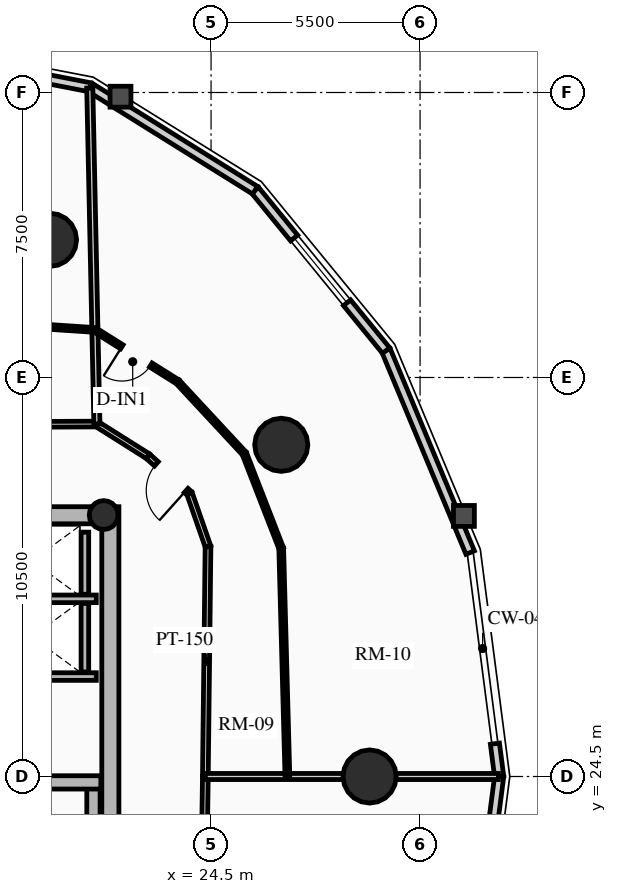
"""IFC4 building model, lengths in metres.
Left out: names, types, materials, properties, quantities, classifications, styles, units other than length and angle.
Written with IfcOpenShell. Run it as: python <this file> out.ifc"""

import sys

from ifc_helpers import new_model, si_unit, direction, frame, frame_2d, origin, origin_2d, place, context, subcontext, project, spatial, rectangle, circle, hollow_circle, extrude, source, transform, mapped, element, fill, save


model = new_model("IFC4")
c1 = context("Model", 3, precision=1e-05, world=origin(), true_north=direction((0.0, 1.0)))
c2 = subcontext(c1, "Body", "Model", "MODEL_VIEW")
j1 = project(units=[si_unit("LENGTHUNIT", "METRE"), si_unit("PLANEANGLEUNIT", "RADIAN")], contexts=[c1])
p1 = place(None, origin())
s1 = spatial("IfcSite", under=j1, at=p1, CompositionType="ELEMENT")
p2 = place(p1, origin())
s2 = spatial("IfcBuilding", under=s1, at=p2, CompositionType="ELEMENT")
p3 = place(p2, frame((0.0, 0.0, 90.52)))
s3 = spatial("IfcBuildingStorey", under=s2, at=p3, CompositionType="ELEMENT", Elevation=90.52)
p4 = place(p3, frame((21.85, 17.4, 0.0), z_axis=(0.0, 0.0, 1.0), x_axis=(0.0, 1.0, 0.0)))
e1 = element("IfcWall", 1, at=p4, inside=s3, PredefinedType="SHEAR", context=c2, shape_type="SweptSolid", body=[
    extrude(rectangle(XDim=14.2, YDim=0.45, at=frame_2d((7.1, 0.0))), origin(), (0.0, 0.0, 1.0), 2.91),
])
p5 = place(p3, frame((11.15, 31.375, 0.0), z_axis=(0.0, 0.0, 1.0), x_axis=(1.0, 0.0, 0.0)))
e2 = element("IfcWall", 2, at=p5, inside=s3, PredefinedType="SHEAR", context=c2, shape_type="SweptSolid", body=[
    extrude(rectangle(XDim=10.7, YDim=0.45, at=frame_2d((5.35, 0.0))), origin(), (0.0, 0.0, 1.0), 2.91),
])
m1 = source(origin(), c2, "Body", "SweptSolid", [
    extrude(rectangle(XDim=1.5, YDim=2.02, at=frame_2d((0.75, 1.01))), frame((0.0, 0.235, 0.0), z_axis=(0.0, -1.0, 0.0), x_axis=(1.0, 0.0, 0.0)), (0.0, 0.0, 1.0), 0.47),
])
p6 = place(p5, frame((4.6, 0.0, 0.0)))
e3 = element("IfcOpeningElement", 3, at=p6, cuts=e2, PredefinedType="OPENING", context=c2, shape_type="MappedRepresentation", body=[
    mapped(m1, transform((0.0, 0.0, 0.0), x_axis=(1.0, 0.0, 0.0), y_axis=(0.0, 1.0, 0.0), z_axis=(0.0, 0.0, 1.0), scale=1.0)),
])
p7 = place(p3, frame((21.405, 17.625, 0.0), z_axis=(0.0, 0.0, 1.0), x_axis=(0.0, 1.0, 0.0)))
e4 = element("IfcWall", 4, at=p7, inside=s3, PredefinedType="SHEAR", context=c2, shape_type="SweptSolid", body=[
    extrude(rectangle(XDim=6.72, YDim=0.35, at=frame_2d((3.36, 0.0))), origin(), (0.0, 0.0, 1.0), 2.91),
])
p8 = place(p3, frame((18.315, 24.345, 0.0), z_axis=(0.0, 0.0, 1.0), x_axis=(1.0, 0.0, 0.0)))
e5 = element("IfcWall", 5, at=p8, inside=s3, PredefinedType="SHEAR", context=c2, shape_type="SweptSolid", body=[
    extrude(rectangle(XDim=3.285, YDim=0.35, at=frame_2d((1.643, 0.0))), origin(), (0.0, 0.0, 1.0), 2.91),
])
p9 = place(p3, frame((21.675, 31.38, 0.0), z_axis=(0.0, 0.0, 1.0), x_axis=(1.0, 0.0, 0.0)))
e6 = element("IfcColumn", 6, at=p9, inside=s3, PredefinedType="COLUMN", context=c2, shape_type="SweptSolid", body=[
    extrude(hollow_circle(Radius=0.38, WallThickness=0.032, at=origin_2d()), origin(), (0.0, 0.0, 1.0), 2.91),
])
for number, where, z_axis, x_axis in (
    (7, (28.672, 24.5, 0.0), (0.0, 0.0, 1.0), (1.0, 0.0, 0.0)),
    (8, (26.347, 33.229, 0.0), (0.0, 0.0, 1.0), (1.0, 0.0, 0.0)),
    (9, (20.261, 38.623, 0.0), (0.0, 0.0, 1.0), (1.0, 0.0, 0.0)),
):
    element("IfcColumn", number, at=place(p3, frame(where, z_axis=z_axis, x_axis=x_axis)), inside=s3, PredefinedType="USERDEFINED", context=c2, shape_type="SweptSolid", body=[
        extrude(circle(Radius=0.7, at=origin_2d()), origin(), (0.0, 0.0, 1.0), 2.91),
    ])
p10 = place(p3, frame((31.969, 25.363, 0.0), z_axis=(0.0, 0.0, 1.0), x_axis=(0.128523364007, -0.991706481225, 0.0)))
e10 = element("IfcWall", 10, at=p10, inside=s3, PredefinedType="SOLIDWALL", context=c2, shape_type="SweptSolid", body=[
    extrude(rectangle(XDim=0.87, YDim=0.24, at=frame_2d((0.435, 0.0))), origin(), (0.0, 0.0, 1.0), 2.655),
])
p11 = place(p3, frame((29.105, 35.709, 0.0), z_axis=(0.0, 0.0, 1.0), x_axis=(0.384344417632, -0.923189779317, 0.0)))
e11 = element("IfcWall", 11, at=p11, inside=s3, PredefinedType="SOLIDWALL", context=c2, shape_type="SweptSolid", body=[
    extrude(rectangle(XDim=5.758, YDim=0.24, at=frame_2d((2.879, 0.0))), origin(), (0.0, 0.0, 1.0), 2.179),
])
p12 = place(p3, frame((25.658, 39.928, 0.0), z_axis=(0.0, 0.0, 1.0), x_axis=(0.632700781152, -0.77439635945, 0.0)))
e12 = element("IfcWall", 12, at=p12, inside=s3, PredefinedType="SOLIDWALL", context=c2, shape_type="SweptSolid", body=[
    extrude(rectangle(XDim=5.448, YDim=0.24, at=frame_2d((2.724, 0.0))), origin(), (0.0, 0.0, 1.0), 2.179),
])
m2 = source(origin(), c2, "Body", "SweptSolid", [
    extrude(rectangle(XDim=2.2, YDim=1.35, at=frame_2d((1.1, 0.675))), frame((0.0, 0.13, 0.0), z_axis=(0.0, -1.0, 0.0), x_axis=(1.0, 0.0, 0.0)), (0.0, 0.0, 1.0), 0.26),
])
p13 = place(p12, frame((1.624, 0.0, 0.65)))
e13 = element("IfcOpeningElement", 13, at=p13, cuts=e12, PredefinedType="OPENING", context=c2, shape_type="MappedRepresentation", body=[
    mapped(m2, transform((0.0, 0.0, 0.0), x_axis=(1.0, 0.0, 0.0), y_axis=(0.0, 1.0, 0.0), z_axis=(0.0, 0.0, 1.0), scale=1.0)),
])
p14 = place(p3, frame((21.315, 42.637, 0.0), z_axis=(0.0, 0.0, 1.0), x_axis=(0.848520380187, -0.529162701263, 0.0)))
e14 = element("IfcWall", 14, at=p14, inside=s3, PredefinedType="SOLIDWALL", context=c2, shape_type="SweptSolid", body=[
    extrude(rectangle(XDim=5.119, YDim=0.24, at=frame_2d((2.56, 0.0))), origin(), (0.0, 0.0, 1.0), 2.179),
])
p15 = place(p3, frame((16.5, 43.57, 0.0), z_axis=(0.0, 0.0, 1.0), x_axis=(0.981723785992, -0.190311344954, 0.0)))
e15 = element("IfcWall", 15, at=p15, inside=s3, PredefinedType="SOLIDWALL", context=c2, shape_type="SweptSolid", body=[
    extrude(rectangle(XDim=4.904, YDim=0.24, at=frame_2d((2.452, 0.0))), origin(), (0.0, 0.0, 1.0), 2.179),
])
m3 = source(origin(), c2, "Body", "SweptSolid", [
    extrude(rectangle(XDim=1.9, YDim=1.35, at=frame_2d((0.95, 0.675))), frame((0.0, 0.13, 0.0), z_axis=(0.0, -1.0, 0.0), x_axis=(1.0, 0.0, 0.0)), (0.0, 0.0, 1.0), 0.26),
])
p16 = place(p15, frame((1.502, 0.0, 0.65)))
e16 = element("IfcOpeningElement", 16, at=p16, cuts=e15, PredefinedType="OPENING", context=c2, shape_type="MappedRepresentation", body=[
    mapped(m3, transform((0.0, 0.0, 0.0), x_axis=(1.0, 0.0, 0.0), y_axis=(0.0, 1.0, 0.0), z_axis=(0.0, 0.0, 1.0), scale=1.0)),
])
p17 = place(p3, frame((32.081, 24.5, 0.0), z_axis=(0.0, 0.0, 1.0), x_axis=(-0.128351991996, -0.991728675672, 0.0)))
e17 = element("IfcWall", 17, at=p17, inside=s3, PredefinedType="SOLIDWALL", context=c2, shape_type="SweptSolid", body=[
    extrude(rectangle(XDim=5.942, YDim=0.24, at=frame_2d((2.971, 0.0))), origin(), (0.0, 0.0, 1.0), 2.179),
])
p18 = place(p17, frame((2.021, 0.0, 0.65)))
e18 = element("IfcOpeningElement", 18, at=p18, cuts=e17, PredefinedType="OPENING", context=c2, shape_type="MappedRepresentation", body=[
    mapped(m3, transform((0.0, 0.0, 0.0), x_axis=(1.0, 0.0, 0.0), y_axis=(0.0, 1.0, 0.0), z_axis=(0.0, 0.0, 1.0), scale=1.0)),
])
for number, where, z_axis, x_axis in (
    (19, (18.51, 27.13, 0.0), (0.0, 0.0, 1.0), (1.0, 0.0, 0.0)),
    (20, (18.51, 29.175, 0.0), (0.0, 0.0, 1.0), (1.0, 0.0, 0.0)),
):
    element("IfcWall", number, at=place(p3, frame(where, z_axis=z_axis, x_axis=x_axis)), inside=s3, PredefinedType="SHEAR", context=c2, shape_type="SweptSolid", body=[
        extrude(rectangle(XDim=2.97, YDim=0.2, at=frame_2d((1.485, 0.0))), origin(), (0.0, 0.0, 1.0), 2.91),
    ])
p19 = place(p3, frame((21.18, 27.25, 0.0), z_axis=(0.0, 0.0, 1.0), x_axis=(0.0, 1.0, 0.0)))
e21 = element("IfcWall", 21, at=p19, inside=s3, PredefinedType="SHEAR", context=c2, shape_type="SweptSolid", body=[
    extrude(rectangle(XDim=1.805, YDim=0.2, at=frame_2d((0.902, 0.0))), origin(), (0.0, 0.0, 1.0), 2.91),
])
p20 = place(p3, frame((21.18, 29.295, 0.0), z_axis=(0.0, 0.0, 1.0), x_axis=(0.0, 1.0, 0.0)))
e22 = element("IfcWall", 22, at=p20, inside=s3, PredefinedType="SHEAR", context=c2, shape_type="SweptSolid", body=[
    extrude(rectangle(XDim=1.635, YDim=0.2, at=frame_2d((0.817, 0.0))), origin(), (0.0, 0.0, 1.0), 2.91),
])
p21 = place(p3, frame((24.35, 24.5, 0.0), z_axis=(0.0, 0.0, 1.0), x_axis=(0.011582078845, 0.999932925475, 0.0)))
e23 = element("IfcWall", 23, at=p21, inside=s3, PredefinedType="PARTITIONING", context=c2, shape_type="SweptSolid", body=[
    extrude(rectangle(XDim=6.05, YDim=0.15, at=frame_2d((3.025, 0.0))), origin(), (0.0, 0.0, 1.0), 2.225),
])
p22 = place(p3, frame((24.42, 30.549, 0.0), z_axis=(0.0, 0.0, 1.0), x_axis=(-0.329071042252, 0.944305167386, 0.0)))
e24 = element("IfcWall", 24, at=p22, inside=s3, PredefinedType="PARTITIONING", context=c2, shape_type="SweptSolid", body=[
    extrude(rectangle(XDim=1.479, YDim=0.15, at=frame_2d((0.74, 0.0))), origin(), (0.0, 0.0, 1.0), 2.225),
])
p23 = place(p3, frame((23.933, 31.946, 0.0), z_axis=(0.0, 0.0, 1.0), x_axis=(-0.744529651383, 0.667589393423, 0.0)))
e25 = element("IfcWall", 25, at=p23, inside=s3, PredefinedType="PARTITIONING", context=c2, shape_type="SweptSolid", body=[
    extrude(rectangle(XDim=1.472, YDim=0.15, at=frame_2d((0.736, 0.0))), origin(), (0.0, 0.0, 1.0), 2.225),
])
m4 = source(origin(), c2, "Body", "SweptSolid", [
    extrude(rectangle(XDim=1.05, YDim=2.015, at=frame_2d((0.525, 1.007))), frame((0.0, 0.085, 0.0), z_axis=(0.0, -1.0, 0.0), x_axis=(1.0, 0.0, 0.0)), (0.0, 0.0, 1.0), 0.17),
])
p24 = place(p23, frame((0.12, 0.0, 0.0)))
e26 = element("IfcOpeningElement", 26, at=p24, cuts=e25, PredefinedType="OPENING", context=c2, shape_type="MappedRepresentation", body=[
    mapped(m4, transform((0.0, 0.0, 0.0), x_axis=(1.0, 0.0, 0.0), y_axis=(0.0, 1.0, 0.0), z_axis=(0.0, 0.0, 1.0), scale=1.0)),
])
p25 = place(p3, frame((22.837, 32.929, 0.0), z_axis=(0.0, 0.0, 1.0), x_axis=(-0.84581079329, 0.533482991252, 0.0)))
e27 = element("IfcWall", 27, at=p25, inside=s3, PredefinedType="PARTITIONING", context=c2, shape_type="SweptSolid", body=[
    extrude(rectangle(XDim=1.585, YDim=0.15, at=frame_2d((0.792, 0.0))), origin(), (0.0, 0.0, 1.0), 2.225),
])
p26 = place(p3, frame((21.496, 33.775, 0.0), z_axis=(0.0, 0.0, 1.0), x_axis=(-0.999989544737, -0.004572790979, 0.0)))
e28 = element("IfcWall", 28, at=p26, inside=s3, PredefinedType="PARTITIONING", context=c2, shape_type="SweptSolid", body=[
    extrude(rectangle(XDim=3.364, YDim=0.15, at=frame_2d((1.682, 0.0))), origin(), (0.0, 0.0, 1.0), 2.225),
])
p27 = place(p3, frame((24.264, 18.561, 0.0), z_axis=(0.0, 0.0, 1.0), x_axis=(0.014427504204, 0.999895918145, 0.0)))
e29 = element("IfcWall", 29, at=p27, inside=s3, PredefinedType="PARTITIONING", context=c2, shape_type="SweptSolid", body=[
    extrude(rectangle(XDim=5.94, YDim=0.15, at=frame_2d((2.97, 0.0))), origin(), (0.0, 0.0, 1.0), 2.655),
])
m5 = source(origin(), c2, "Body", "SweptSolid", [
    extrude(rectangle(XDim=1.0, YDim=2.015, at=frame_2d((0.5, 1.007))), frame((0.0, 0.085, 0.0), z_axis=(0.0, -1.0, 0.0), x_axis=(1.0, 0.0, 0.0)), (0.0, 0.0, 1.0), 0.17),
])
p28 = place(p27, frame((2.47, 0.0, 0.0)))
e30 = element("IfcOpeningElement", 30, at=p28, cuts=e29, PredefinedType="OPENING", context=c2, shape_type="MappedRepresentation", body=[
    mapped(m5, transform((0.0, 0.0, 0.0), x_axis=(1.0, 0.0, 0.0), y_axis=(0.0, 1.0, 0.0), z_axis=(0.0, 0.0, 1.0), scale=1.0)),
])
p29 = place(p3, frame((24.35, 24.5, 0.0), z_axis=(0.0, 0.0, 1.0), x_axis=(1.0, 0.0, 0.0)))
e31 = element("IfcWall", 31, at=p29, inside=s3, PredefinedType="PARTITIONING", context=c2, shape_type="SweptSolid", body=[
    extrude(rectangle(XDim=7.711, YDim=0.16, at=frame_2d((3.855, 0.0))), origin(), (0.0, 0.0, 1.0), 2.179),
])
p30 = place(p3, frame((21.496, 33.775, 0.0), z_axis=(0.0, 0.0, 1.0), x_axis=(-0.021226580265, 0.999774690763, 0.0)))
e32 = element("IfcWall", 32, at=p30, inside=s3, PredefinedType="PARTITIONING", context=c2, shape_type="SweptSolid", body=[
    extrude(rectangle(XDim=8.845, YDim=0.16, at=frame_2d((4.422, 0.0))), origin(), (0.0, 0.0, 1.0), 2.179),
])
p31 = place(p3, frame((26.509, 24.5, 0.0), z_axis=(0.0, 0.0, 1.0), x_axis=(-0.027112670792, 0.99963238397, 0.0)))
e33 = element("IfcWall", 33, at=p31, inside=s3, PredefinedType="PARTITIONING", context=c2, shape_type="SweptSolid", body=[
    extrude(rectangle(XDim=6.006, YDim=0.125, at=frame_2d((3.003, 0.0))), origin(), (0.0, 0.0, 1.0), 2.225),
])
p32 = place(p3, frame((26.346, 30.504, 0.0), z_axis=(0.0, 0.0, 1.0), x_axis=(-0.362402208915, 0.932021801769, 0.0)))
e34 = element("IfcWall", 34, at=p32, inside=s3, PredefinedType="PARTITIONING", context=c2, shape_type="SweptSolid", body=[
    extrude(rectangle(XDim=2.675, YDim=0.125, at=frame_2d((1.337, 0.0))), origin(), (0.0, 0.0, 1.0), 2.225),
])
p33 = place(p3, frame((25.377, 32.997, 0.0), z_axis=(0.0, 0.0, 1.0), x_axis=(-0.680516524321, 0.732732734445, 0.0)))
e35 = element("IfcWall", 35, at=p33, inside=s3, PredefinedType="PARTITIONING", context=c2, shape_type="SweptSolid", body=[
    extrude(rectangle(XDim=2.576, YDim=0.125, at=frame_2d((1.288, 0.0))), origin(), (0.0, 0.0, 1.0), 2.655),
])
p34 = place(p3, frame((23.624, 34.884, 0.0), z_axis=(0.0, 0.0, 1.0), x_axis=(-0.84728326465, 0.531141289531, 0.0)))
e36 = element("IfcWall", 36, at=p34, inside=s3, PredefinedType="PARTITIONING", context=c2, shape_type="SweptSolid", body=[
    extrude(rectangle(XDim=2.573, YDim=0.125, at=frame_2d((1.287, 0.0))), origin(), (0.0, 0.0, 1.0), 2.225),
])
m6 = source(origin(), c2, "Body", "SweptSolid", [
    extrude(rectangle(XDim=0.9, YDim=2.005, at=frame_2d((0.45, 1.002))), frame((0.0, 0.073, 0.0), z_axis=(0.0, -1.0, 0.0), x_axis=(1.0, 0.0, 0.0)), (0.0, 0.0, 1.0), 0.145),
])
p35 = place(p34, frame((0.836, 0.0, 0.0)))
e37 = element("IfcOpeningElement", 37, at=p35, cuts=e36, PredefinedType="OPENING", context=c2, shape_type="MappedRepresentation", body=[
    mapped(m6, transform((0.0, 0.0, 0.0), x_axis=(1.0, 0.0, 0.0), y_axis=(0.0, 1.0, 0.0), z_axis=(0.0, 0.0, 1.0), scale=1.0)),
])
p36 = place(p3, frame((21.444, 36.251, 0.0), z_axis=(0.0, 0.0, 1.0), x_axis=(-0.997810544349, 0.066137112017, 0.0)))
e38 = element("IfcWall", 38, at=p36, inside=s3, PredefinedType="PARTITIONING", context=c2, shape_type="SweptSolid", body=[
    extrude(rectangle(XDim=3.776, YDim=0.125, at=frame_2d((1.888, 0.0))), origin(), (0.0, 0.0, 1.0), 2.225),
])
m7 = source(origin(), c2, "Body", "SweptSolid", [
    extrude(rectangle(XDim=2.2, YDim=1.35, at=frame_2d((1.1, 0.675))), frame((0.0, 0.03, 0.0), z_axis=(0.0, -1.0, 0.0), x_axis=(1.0, 0.0, 0.0)), (0.0, 0.0, 1.0), 0.06),
])
p37 = place(p13, origin())
e39 = element("IfcWindow", 39, at=p37, inside=s3, PartitioningType="DOUBLE_PANEL_VERTICAL", PredefinedType="WINDOW", context=c2, shape_type="MappedRepresentation", body=[
    mapped(m7, transform((0.0, 0.0, 0.0), x_axis=(1.0, 0.0, 0.0), y_axis=(0.0, 1.0, 0.0), z_axis=(0.0, 0.0, 1.0), scale=1.0)),
])
fill(e13, e39)
m8 = source(origin(), c2, "Body", "SweptSolid", [
    extrude(rectangle(XDim=1.05, YDim=2.015, at=frame_2d((0.525, 1.007))), frame((0.0, 0.025, 0.0), z_axis=(0.0, -1.0, 0.0), x_axis=(1.0, 0.0, 0.0)), (0.0, 0.0, 1.0), 0.05),
])
p38 = place(p24, origin())
e40 = element("IfcDoor", 40, at=p38, inside=s3, OperationType="SINGLE_SWING_LEFT", PredefinedType="DOOR", context=c2, shape_type="MappedRepresentation", body=[
    mapped(m8, transform((0.0, 0.0, 0.0), x_axis=(1.0, 0.0, 0.0), y_axis=(0.0, 1.0, 0.0), z_axis=(0.0, 0.0, 1.0), scale=1.0)),
])
fill(e26, e40)
m9 = source(origin(), c2, "Body", "SweptSolid", [
    extrude(rectangle(XDim=0.9, YDim=2.005, at=frame_2d((0.45, 1.002))), frame((0.0, 0.025, 0.0), z_axis=(0.0, -1.0, 0.0), x_axis=(1.0, 0.0, 0.0)), (0.0, 0.0, 1.0), 0.05),
])
p39 = place(p35, origin())
e41 = element("IfcDoor", 41, at=p39, inside=s3, OperationType="SINGLE_SWING_RIGHT", PredefinedType="DOOR", context=c2, shape_type="MappedRepresentation", body=[
    mapped(m9, transform((0.0, 0.0, 0.0), x_axis=(1.0, 0.0, 0.0), y_axis=(0.0, 1.0, 0.0), z_axis=(0.0, 0.0, 1.0), scale=1.0)),
])
fill(e37, e41)
save(model, sys.argv[1])
